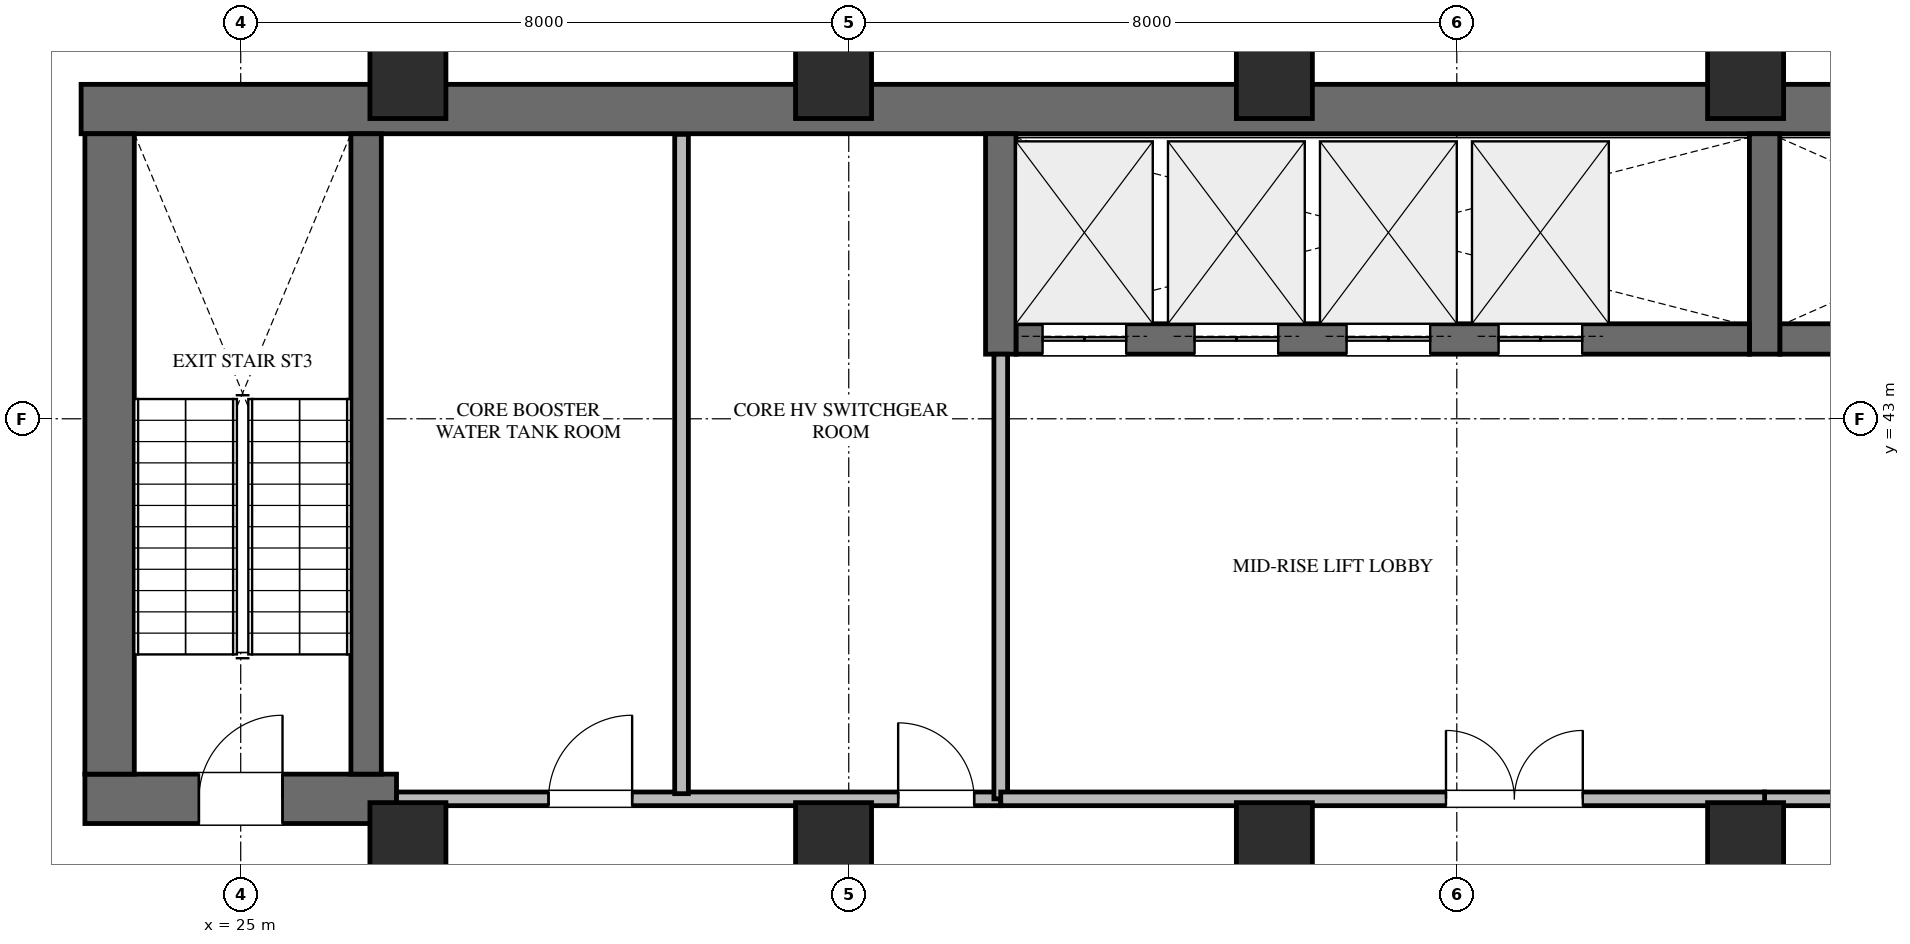
"""IFC4 building model, lengths in metres.
Left out: names, types, materials, properties, quantities, classifications, styles, units other than length and angle.
Written with IfcOpenShell. Run it as: python <this file> out.ifc"""

import sys

from ifc_helpers import new_model, si_unit, direction, frame, frame_2d, origin, origin_2d, place, context, subcontext, project, spatial, rectangle, extrude, element, fill, save


model = new_model("IFC4")
c1 = context("Model", 3, precision=1e-05, world=origin(), true_north=direction((0.0, 1.0)))
c2 = subcontext(c1, "Body", "Model", "MODEL_VIEW")
j1 = project(units=[si_unit("LENGTHUNIT", "METRE"), si_unit("PLANEANGLEUNIT", "RADIAN")], contexts=[c1])
p1 = place(None, origin())
s1 = spatial("IfcSite", under=j1, at=p1, CompositionType="ELEMENT")
p2 = place(p1, origin())
s2 = spatial("IfcBuilding", under=s1, at=p2, CompositionType="ELEMENT")
p3 = place(p2, frame((0.0, 0.0, 156.0)))
s3 = spatial("IfcBuildingStorey", under=s2, at=p3, CompositionType="ELEMENT", Elevation=156.0)
p4 = place(p3, frame((22.9, 47.075, 0.0), z_axis=(0.0, 0.0, 1.0), x_axis=(1.0, 0.0, 0.0)))
e1 = element("IfcWall", 1, at=p4, inside=s3, PredefinedType="SHEAR", context=c2, shape_type="SweptSolid", body=[
    extrude(rectangle(XDim=43.6, YDim=0.65, at=frame_2d((21.8, 0.0))), origin(), (0.0, 0.0, 1.0), 4.5),
])
p5 = place(p3, frame((45.25, 44.05, 0.0), z_axis=(0.0, 0.0, 1.0), x_axis=(1.0, 0.0, 0.0)))
e2 = element("IfcWall", 2, at=p5, inside=s3, PredefinedType="SHEAR", context=c2, shape_type="SweptSolid", body=[
    extrude(rectangle(XDim=5.6, YDim=0.4, at=frame_2d((2.8, 0.0))), origin(), (0.0, 0.0, 1.0), 4.5),
])
p6 = place(p3, frame((45.05, 43.85, 0.0), z_axis=(0.0, 0.0, 1.0), x_axis=(0.0, 1.0, 0.0)))
e3 = element("IfcWall", 3, at=p6, inside=s3, PredefinedType="SHEAR", context=c2, shape_type="SweptSolid", body=[
    extrude(rectangle(XDim=2.9, YDim=0.4, at=frame_2d((1.45, 0.0))), origin(), (0.0, 0.0, 1.0), 4.5),
])
p7 = place(p3, frame((35.2, 44.05, 0.0), z_axis=(0.0, 0.0, 1.0), x_axis=(1.0, 0.0, 0.0)))
e4 = element("IfcWall", 4, at=p7, inside=s3, PredefinedType="SHEAR", context=c2, shape_type="SweptSolid", body=[
    extrude(rectangle(XDim=9.65, YDim=0.4, at=frame_2d((4.825, 0.0))), origin(), (0.0, 0.0, 1.0), 4.5),
])
p8 = place(p7, frame((0.35, 0.0, 0.0)))
e5 = element("IfcOpeningElement", 5, at=p8, cuts=e4, PredefinedType="OPENING", context=c2, shape_type="SweptSolid", body=[
    extrude(rectangle(XDim=1.1, YDim=2.2, at=frame_2d((0.55, 1.1))), frame((0.0, 0.21, 0.0), z_axis=(0.0, -1.0, 0.0), x_axis=(1.0, 0.0, 0.0)), (0.0, 0.0, 1.0), 0.42),
])
p9 = place(p7, frame((2.35, 0.0, 0.0)))
e6 = element("IfcOpeningElement", 6, at=p9, cuts=e4, PredefinedType="OPENING", context=c2, shape_type="SweptSolid", body=[
    extrude(rectangle(XDim=1.1, YDim=2.2, at=frame_2d((0.55, 1.1))), frame((0.0, 0.21, 0.0), z_axis=(0.0, -1.0, 0.0), x_axis=(1.0, 0.0, 0.0)), (0.0, 0.0, 1.0), 0.42),
])
p10 = place(p7, frame((4.35, 0.0, 0.0)))
e7 = element("IfcOpeningElement", 7, at=p10, cuts=e4, PredefinedType="OPENING", context=c2, shape_type="SweptSolid", body=[
    extrude(rectangle(XDim=1.1, YDim=2.2, at=frame_2d((0.55, 1.1))), frame((0.0, 0.21, 0.0), z_axis=(0.0, -1.0, 0.0), x_axis=(1.0, 0.0, 0.0)), (0.0, 0.0, 1.0), 0.42),
])
p11 = place(p7, frame((6.35, 0.0, 0.0)))
e8 = element("IfcOpeningElement", 8, at=p11, cuts=e4, PredefinedType="OPENING", context=c2, shape_type="SweptSolid", body=[
    extrude(rectangle(XDim=1.1, YDim=2.2, at=frame_2d((0.55, 1.1))), frame((0.0, 0.21, 0.0), z_axis=(0.0, -1.0, 0.0), x_axis=(1.0, 0.0, 0.0)), (0.0, 0.0, 1.0), 0.42),
])
p12 = place(p3, frame((35.0, 43.85, 0.0), z_axis=(0.0, 0.0, 1.0), x_axis=(0.0, 1.0, 0.0)))
e9 = element("IfcWall", 9, at=p12, inside=s3, PredefinedType="SHEAR", context=c2, shape_type="SweptSolid", body=[
    extrude(rectangle(XDim=2.9, YDim=0.4, at=frame_2d((1.45, 0.0))), origin(), (0.0, 0.0, 1.0), 4.5),
])
p13 = place(p3, frame((22.95, 38.0, 0.0), z_axis=(0.0, 0.0, 1.0), x_axis=(1.0, 0.0, 0.0)))
e10 = element("IfcWall", 10, at=p13, inside=s3, PredefinedType="SHEAR", context=c2, shape_type="SweptSolid", body=[
    extrude(rectangle(XDim=4.1, YDim=0.65, at=frame_2d((2.05, 0.0))), origin(), (0.0, 0.0, 1.0), 4.5),
])
p14 = place(p13, frame((1.5, 0.0, 0.0)))
e11 = element("IfcOpeningElement", 11, at=p14, cuts=e10, PredefinedType="OPENING", context=c2, shape_type="SweptSolid", body=[
    extrude(rectangle(XDim=1.1, YDim=2.2, at=frame_2d((0.55, 1.1))), frame((0.0, 0.335, 0.0), z_axis=(0.0, -1.0, 0.0), x_axis=(1.0, 0.0, 0.0)), (0.0, 0.0, 1.0), 0.67),
])
p15 = place(p3, frame((23.275, 38.325, 0.0), z_axis=(0.0, 0.0, 1.0), x_axis=(0.0, 1.0, 0.0)))
e12 = element("IfcWall", 12, at=p15, inside=s3, PredefinedType="SHEAR", context=c2, shape_type="SweptSolid", body=[
    extrude(rectangle(XDim=8.425, YDim=0.65, at=frame_2d((4.212, 0.0))), origin(), (0.0, 0.0, 1.0), 4.5),
])
p16 = place(p3, frame((26.65, 38.325, 0.0), z_axis=(0.0, 0.0, 1.0), x_axis=(0.0, 1.0, 0.0)))
e13 = element("IfcWall", 13, at=p16, inside=s3, PredefinedType="SHEAR", context=c2, shape_type="SweptSolid", body=[
    extrude(rectangle(XDim=8.425, YDim=0.4, at=frame_2d((4.212, 0.0))), origin(), (0.0, 0.0, 1.0), 4.5),
])
for number, where, z_axis, x_axis in (
    (14, (44.8, 37.35, 0.0), (0.0, 0.0, 1.0), (1.0, 0.0, 0.0)),
    (15, (44.8, 47.55, 0.0), (0.0, 0.0, 1.0), (1.0, 0.0, 0.0)),
    (16, (38.6, 37.35, 0.0), (0.0, 0.0, 1.0), (1.0, 0.0, 0.0)),
    (17, (38.6, 47.55, 0.0), (0.0, 0.0, 1.0), (1.0, 0.0, 0.0)),
    (18, (32.8, 37.35, 0.0), (0.0, 0.0, 1.0), (1.0, 0.0, 0.0)),
    (19, (32.8, 47.55, 0.0), (0.0, 0.0, 1.0), (1.0, 0.0, 0.0)),
    (20, (27.2, 37.35, 0.0), (0.0, 0.0, 1.0), (1.0, 0.0, 0.0)),
    (21, (27.2, 47.55, 0.0), (0.0, 0.0, 1.0), (1.0, 0.0, 0.0)),
):
    element("IfcColumn", number, at=place(p3, frame(where, z_axis=z_axis, x_axis=x_axis)), inside=s3, PredefinedType="COLUMN", context=c2, shape_type="SweptSolid", body=[
        extrude(rectangle(XDim=1.0, YDim=1.2, at=origin_2d()), origin(), (0.0, 0.0, 1.0), 4.5),
    ])
p17 = place(p3, frame((45.05, 38.0, 0.0), z_axis=(0.0, 0.0, 1.0), x_axis=(1.0, 0.0, 0.0)))
e22 = element("IfcWall", 22, at=p17, inside=s3, PredefinedType="STANDARD", context=c2, shape_type="SweptSolid", body=[
    extrude(rectangle(XDim=5.75, YDim=0.18, at=frame_2d((2.875, 0.0))), origin(), (0.0, 0.0, 1.0), 3.394),
])
p18 = place(p17, frame((2.24, 0.0, 0.0)))
e23 = element("IfcOpeningElement", 23, at=p18, cuts=e22, PredefinedType="OPENING", context=c2, shape_type="SweptSolid", body=[
    extrude(rectangle(XDim=1.1, YDim=2.2, at=frame_2d((0.55, 1.1))), frame((0.0, 0.1, 0.0), z_axis=(0.0, -1.0, 0.0), x_axis=(1.0, 0.0, 0.0)), (0.0, 0.0, 1.0), 0.2),
])
p19 = place(p3, frame((27.05, 38.0, 0.0), z_axis=(0.0, 0.0, 1.0), x_axis=(1.0, 0.0, 0.0)))
e24 = element("IfcWall", 24, at=p19, inside=s3, PredefinedType="STANDARD", context=c2, shape_type="SweptSolid", body=[
    extrude(rectangle(XDim=7.95, YDim=0.18, at=frame_2d((3.975, 0.0))), origin(), (0.0, 0.0, 1.0), 3.394),
])
p20 = place(p19, frame((2.0, 0.0, 0.0)))
e25 = element("IfcOpeningElement", 25, at=p20, cuts=e24, PredefinedType="OPENING", context=c2, shape_type="SweptSolid", body=[
    extrude(rectangle(XDim=1.1, YDim=2.2, at=frame_2d((0.55, 1.1))), frame((0.0, 0.1, 0.0), z_axis=(0.0, -1.0, 0.0), x_axis=(1.0, 0.0, 0.0)), (0.0, 0.0, 1.0), 0.2),
])
p21 = place(p19, frame((6.6, 0.0, 0.0)))
e26 = element("IfcOpeningElement", 26, at=p21, cuts=e24, PredefinedType="OPENING", context=c2, shape_type="SweptSolid", body=[
    extrude(rectangle(XDim=1.0, YDim=2.15, at=frame_2d((0.5, 1.075))), frame((0.0, 0.1, 0.0), z_axis=(0.0, -1.0, 0.0), x_axis=(1.0, 0.0, 0.0)), (0.0, 0.0, 1.0), 0.2),
])
p22 = place(p3, frame((35.0, 38.0, 0.0), z_axis=(0.0, 0.0, 1.0), x_axis=(0.0, 1.0, 0.0)))
e27 = element("IfcWall", 27, at=p22, inside=s3, PredefinedType="STANDARD", context=c2, shape_type="SweptSolid", body=[
    extrude(rectangle(XDim=5.85, YDim=0.18, at=frame_2d((2.925, 0.0))), origin(), (0.0, 0.0, 1.0), 4.25),
])
p23 = place(p3, frame((30.8, 38.068, 0.0), z_axis=(0.0, 0.0, 1.0), x_axis=(0.0, 1.0, 0.0)))
e28 = element("IfcWall", 28, at=p23, inside=s3, PredefinedType="STANDARD", context=c2, shape_type="SweptSolid", body=[
    extrude(rectangle(XDim=8.674, YDim=0.18, at=frame_2d((4.337, 0.0))), origin(), (0.0, 0.0, 1.0), 4.25),
])
p24 = place(p3, frame((35.0, 38.0, 0.0), z_axis=(0.0, 0.0, 1.0), x_axis=(1.0, 0.0, 0.0)))
e29 = element("IfcWall", 29, at=p24, inside=s3, PredefinedType="STANDARD", context=c2, shape_type="SweptSolid", body=[
    extrude(rectangle(XDim=10.05, YDim=0.18, at=frame_2d((5.025, 0.0))), origin(), (0.0, 0.0, 1.0), 3.394),
])
p25 = place(p24, frame((5.858, 0.0, 0.0)))
e30 = element("IfcOpeningElement", 30, at=p25, cuts=e29, PredefinedType="OPENING", context=c2, shape_type="SweptSolid", body=[
    extrude(rectangle(XDim=1.8, YDim=2.2, at=frame_2d((0.9, 1.1))), frame((0.0, 0.1, 0.0), z_axis=(0.0, -1.0, 0.0), x_axis=(1.0, 0.0, 0.0)), (0.0, 0.0, 1.0), 0.2),
])
p26 = place(p14, origin())
e31 = element("IfcDoor", 31, at=p26, inside=s3, OperationType="SINGLE_SWING_RIGHT", PredefinedType="DOOR", context=c2, shape_type="SweptSolid", body=[
    extrude(rectangle(XDim=1.1, YDim=2.2, at=frame_2d((0.55, 1.1))), frame((0.0, 0.025, 0.0), z_axis=(0.0, -1.0, 0.0), x_axis=(1.0, 0.0, 0.0)), (0.0, 0.0, 1.0), 0.05),
])
fill(e11, e31)
p27 = place(p8, origin())
e32 = element("IfcDoor", 32, at=p27, inside=s3, OperationType="DOUBLE_DOOR_SLIDING", PredefinedType="DOOR", context=c2, shape_type="SweptSolid", body=[
    extrude(rectangle(XDim=1.1, YDim=2.2, at=frame_2d((0.55, 1.1))), frame((0.0, 0.025, 0.0), z_axis=(0.0, -1.0, 0.0), x_axis=(1.0, 0.0, 0.0)), (0.0, 0.0, 1.0), 0.05),
])
fill(e5, e32)
p28 = place(p9, origin())
e33 = element("IfcDoor", 33, at=p28, inside=s3, OperationType="DOUBLE_DOOR_SLIDING", PredefinedType="DOOR", context=c2, shape_type="SweptSolid", body=[
    extrude(rectangle(XDim=1.1, YDim=2.2, at=frame_2d((0.55, 1.1))), frame((0.0, 0.025, 0.0), z_axis=(0.0, -1.0, 0.0), x_axis=(1.0, 0.0, 0.0)), (0.0, 0.0, 1.0), 0.05),
])
fill(e6, e33)
p29 = place(p10, origin())
e34 = element("IfcDoor", 34, at=p29, inside=s3, OperationType="DOUBLE_DOOR_SLIDING", PredefinedType="DOOR", context=c2, shape_type="SweptSolid", body=[
    extrude(rectangle(XDim=1.1, YDim=2.2, at=frame_2d((0.55, 1.1))), frame((0.0, 0.025, 0.0), z_axis=(0.0, -1.0, 0.0), x_axis=(1.0, 0.0, 0.0)), (0.0, 0.0, 1.0), 0.05),
])
fill(e7, e34)
p30 = place(p11, origin())
e35 = element("IfcDoor", 35, at=p30, inside=s3, OperationType="DOUBLE_DOOR_SLIDING", PredefinedType="DOOR", context=c2, shape_type="SweptSolid", body=[
    extrude(rectangle(XDim=1.1, YDim=2.2, at=frame_2d((0.55, 1.1))), frame((0.0, 0.025, 0.0), z_axis=(0.0, -1.0, 0.0), x_axis=(1.0, 0.0, 0.0)), (0.0, 0.0, 1.0), 0.05),
])
fill(e8, e35)
p31 = place(p20, origin())
e36 = element("IfcDoor", 36, at=p31, inside=s3, OperationType="SINGLE_SWING_RIGHT", PredefinedType="DOOR", context=c2, shape_type="SweptSolid", body=[
    extrude(rectangle(XDim=1.1, YDim=2.2, at=frame_2d((0.55, 1.1))), frame((0.0, 0.025, 0.0), z_axis=(0.0, -1.0, 0.0), x_axis=(1.0, 0.0, 0.0)), (0.0, 0.0, 1.0), 0.05),
])
fill(e25, e36)
p32 = place(p21, origin())
e37 = element("IfcDoor", 37, at=p32, inside=s3, OperationType="SINGLE_SWING_LEFT", PredefinedType="DOOR", context=c2, shape_type="SweptSolid", body=[
    extrude(rectangle(XDim=1.0, YDim=2.15, at=frame_2d((0.5, 1.075))), frame((0.0, 0.025, 0.0), z_axis=(0.0, -1.0, 0.0), x_axis=(1.0, 0.0, 0.0)), (0.0, 0.0, 1.0), 0.05),
])
fill(e26, e37)
p33 = place(p25, origin())
e38 = element("IfcDoor", 38, at=p33, inside=s3, OperationType="DOUBLE_DOOR_SINGLE_SWING", PredefinedType="DOOR", context=c2, shape_type="SweptSolid", body=[
    extrude(rectangle(XDim=1.8, YDim=2.2, at=frame_2d((0.9, 1.1))), frame((0.0, 0.025, 0.0), z_axis=(0.0, -1.0, 0.0), x_axis=(1.0, 0.0, 0.0)), (0.0, 0.0, 1.0), 0.05),
])
fill(e30, e38)
save(model, sys.argv[1])
